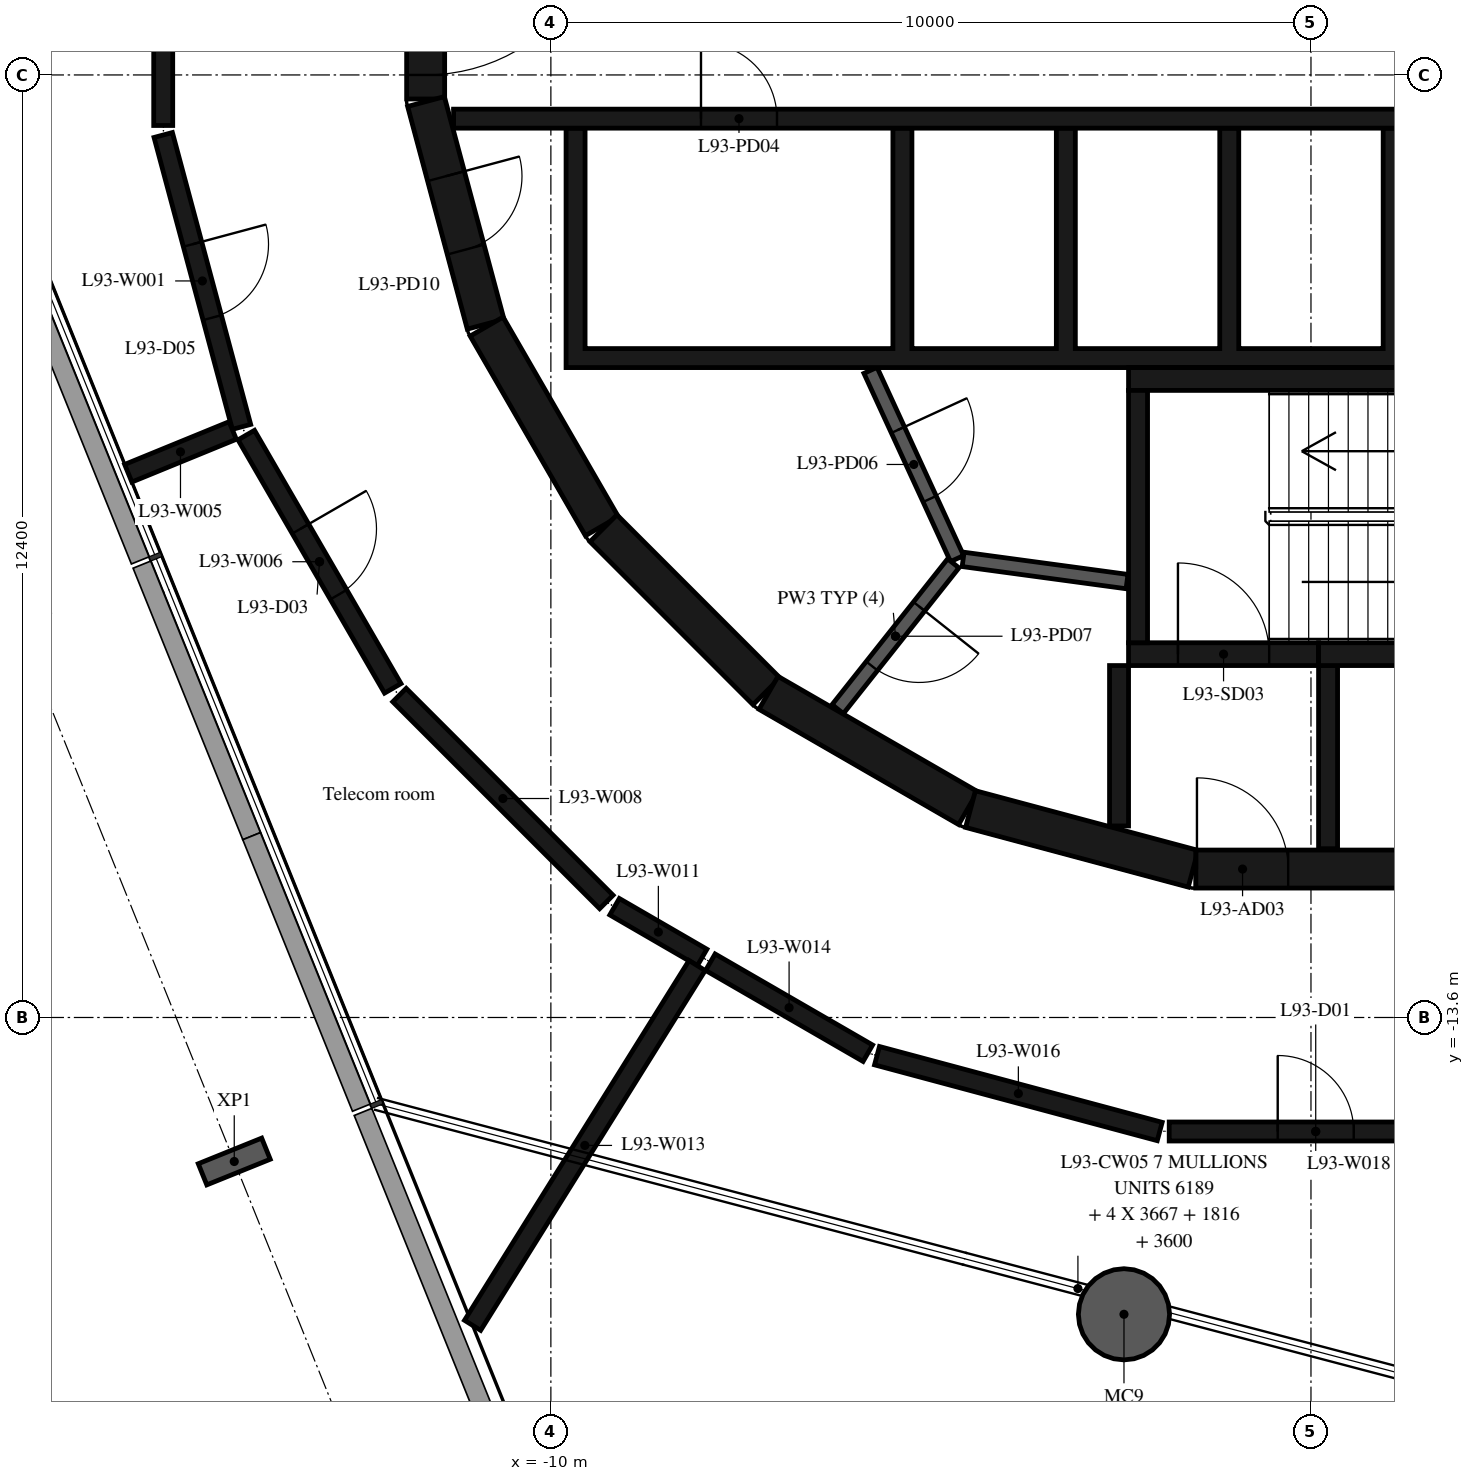
"""IFC4 building model, lengths in metres.
Left out: names, types, materials, properties, quantities, classifications, styles, units other than length and angle.
Written with IfcOpenShell. Run it as: python <this file> out.ifc"""

import sys

from ifc_helpers import new_model, si_unit, direction, frame, frame_2d, origin, origin_2d, place, context, subcontext, project, spatial, polyline, rectangle, hollow_circle, i_section, outline, extrude, element, fill, save


model = new_model("IFC4")
c1 = context("Model", 3, precision=1e-05, world=origin(), true_north=direction((0.0, 1.0)))
c2 = subcontext(c1, "Body", "Model", "MODEL_VIEW")
j1 = project(units=[si_unit("LENGTHUNIT", "METRE"), si_unit("PLANEANGLEUNIT", "RADIAN")], contexts=[c1])
p1 = place(None, origin())
s1 = spatial("IfcSite", under=j1, at=p1, CompositionType="ELEMENT")
p2 = place(p1, origin())
s2 = spatial("IfcBuilding", under=s1, at=p2, CompositionType="ELEMENT")
p3 = place(p2, frame((0.0, 0.0, 361.0)))
s3 = spatial("IfcBuildingStorey", under=s2, at=p3, CompositionType="ELEMENT", Elevation=361.0)
p4 = place(p3, frame((-2.46, -17.505, -0.38), z_axis=(0.0, 0.0, 1.0), x_axis=(1.0, 0.0, 0.0)))
e1 = element("IfcColumn", 1, at=p4, inside=s3, PredefinedType="COLUMN", context=c2, shape_type="SweptSolid", body=[
    extrude(hollow_circle(Radius=0.6, WallThickness=0.03, at=origin_2d()), origin(), (0.0, 0.0, 1.0), 5.2),
])
p5 = place(p3, frame((-14.166, -15.495, -0.38), z_axis=(0.0, 0.0, 1.0), x_axis=(-0.374606892434, 0.927183733755, 0.0)))
e2 = element("IfcColumn", 2, at=p5, inside=s3, PredefinedType="COLUMN", context=c2, shape_type="SweptSolid", body=[
    extrude(i_section(OverallWidth=0.3, OverallDepth=0.9, WebThickness=0.019, FlangeThickness=0.035, FilletRadius=0.03, at=origin_2d()), origin(), (0.0, 0.0, 1.0), 5.2),
])
p6 = place(p3, frame((-11.647, 1.516, 0.0), z_axis=(0.0, 0.0, 1.0), x_axis=(0.0, -1.0, 0.0)))
e3 = element("IfcWall", 3, at=p6, inside=s3, PredefinedType="SHEAR", context=c2, shape_type="SweptSolid", body=[
    extrude(rectangle(XDim=3.033, YDim=0.5, at=frame_2d((1.516, 0.0))), origin(), (0.0, 0.0, 1.0), 4.82),
])
p7 = place(p6, frame((0.316, 0.0, 0.0)))
e4 = element("IfcOpeningElement", 4, at=p7, cuts=e3, PredefinedType="OPENING", context=c2, shape_type="SweptSolid", body=[
    extrude(rectangle(XDim=2.4, YDim=2.1, at=frame_2d((1.2, 1.05))), frame((0.0, 0.26, 0.0), z_axis=(0.0, -1.0, 0.0), x_axis=(1.0, 0.0, 0.0)), (0.0, 0.0, 1.0), 0.52),
])
p8 = place(p3, frame((-11.643, -1.55, 0.0), z_axis=(0.0, 0.0, 1.0), x_axis=(0.258734743916, -0.965948410781, 0.0)))
e5 = element("IfcWall", 5, at=p8, inside=s3, PredefinedType="SHEAR", context=c2, shape_type="SweptSolid", body=[
    extrude(rectangle(XDim=3.033, YDim=0.5, at=frame_2d((1.516, 0.0))), origin(), (0.0, 0.0, 1.0), 4.82),
])
p9 = place(p8, frame((1.016, 0.0, 0.0)))
e6 = element("IfcOpeningElement", 6, at=p9, cuts=e5, PredefinedType="OPENING", context=c2, shape_type="SweptSolid", body=[
    extrude(rectangle(XDim=1.0, YDim=2.4, at=frame_2d((0.5, 1.2))), frame((0.0, 0.26, 0.0), z_axis=(0.0, -1.0, 0.0), x_axis=(1.0, 0.0, 0.0)), (0.0, 0.0, 1.0), 0.52),
])
p10 = place(p3, frame((-10.845, -4.51, 0.0), z_axis=(0.0, 0.0, 1.0), x_axis=(0.500087131594, -0.865975092491, 0.0)))
e7 = element("IfcWall", 7, at=p10, inside=s3, PredefinedType="SHEAR", context=c2, shape_type="SweptSolid", body=[
    extrude(rectangle(XDim=3.033, YDim=0.5, at=frame_2d((1.516, 0.0))), origin(), (0.0, 0.0, 1.0), 4.82),
])
p11 = place(p3, frame((-9.308, -7.164, 0.0), z_axis=(0.0, 0.0, 1.0), x_axis=(0.707106781187, -0.707106781187, 0.0)))
e8 = element("IfcWall", 8, at=p11, inside=s3, PredefinedType="SHEAR", context=c2, shape_type="SweptSolid", body=[
    extrude(rectangle(XDim=3.032, YDim=0.5, at=frame_2d((1.516, 0.0))), origin(), (0.0, 0.0, 1.0), 4.82),
])
for number, where, z_axis, x_axis in (
    (9, (-7.137, -9.329, 0.0), (0.0, 0.0, 1.0), (0.866, -0.5, 0.0)),
    (10, (-4.479, -10.858, 0.0), (0.0, 0.0, 1.0), (0.966, -0.259, 0.0)),
):
    element("IfcWall", number, at=place(p3, frame(where, z_axis=z_axis, x_axis=x_axis)), inside=s3, PredefinedType="SHEAR", context=c2, shape_type="SweptSolid", body=[
        extrude(rectangle(XDim=3.033, YDim=0.5, at=frame_2d((1.516, 0.0))), origin(), (0.0, 0.0, 1.0), 4.82),
    ])
p12 = place(p3, frame((-1.516, -11.647, 0.0), z_axis=(0.0, 0.0, 1.0), x_axis=(1.0, 0.0, 0.0)))
e11 = element("IfcWall", 11, at=p12, inside=s3, PredefinedType="SHEAR", context=c2, shape_type="SweptSolid", body=[
    extrude(rectangle(XDim=3.033, YDim=0.5, at=frame_2d((1.516, 0.0))), origin(), (0.0, 0.0, 1.0), 4.82),
])
p13 = place(p12, frame((0.016, 0.0, 0.0)))
e12 = element("IfcOpeningElement", 12, at=p13, cuts=e11, PredefinedType="OPENING", context=c2, shape_type="SweptSolid", body=[
    extrude(rectangle(XDim=1.2, YDim=2.1, at=frame_2d((0.6, 1.05))), frame((0.0, 0.26, 0.0), z_axis=(0.0, -1.0, 0.0), x_axis=(1.0, 0.0, 0.0)), (0.0, 0.0, 1.0), 0.52),
])
p14 = place(p3, frame((-2.275, -8.67, 0.0), z_axis=(0.0, 0.0, 1.0), x_axis=(0.0, 1.0, 0.0)))
e13 = element("IfcWall", 13, at=p14, inside=s3, PredefinedType="SHEAR", context=c2, shape_type="SweptSolid", body=[
    extrude(rectangle(XDim=3.32, YDim=0.25, at=frame_2d((1.66, 0.0))), origin(), (0.0, 0.0, 1.0), 4.82),
])
p15 = place(p3, frame((-2.4, -5.2, 0.0), z_axis=(0.0, 0.0, 1.0), x_axis=(1.0, 0.0, 0.0)))
e14 = element("IfcWall", 14, at=p15, inside=s3, PredefinedType="SHEAR", context=c2, shape_type="SweptSolid", body=[
    extrude(rectangle(XDim=7.05, YDim=0.3, at=frame_2d((3.525, 0.0))), origin(), (0.0, 0.0, 1.0), 4.82),
])
p16 = place(p3, frame((0.1, -8.82, 0.0), z_axis=(0.0, 0.0, 1.0), x_axis=(1.0, 0.0, 0.0)))
e15 = element("IfcWall", 15, at=p16, inside=s3, PredefinedType="SHEAR", context=c2, shape_type="SweptSolid", body=[
    extrude(rectangle(XDim=4.55, YDim=0.3, at=frame_2d((2.275, 0.0))), origin(), (0.0, 0.0, 1.0), 4.82),
])
p17 = place(p3, frame((-2.4, -8.82, 0.0), z_axis=(0.0, 0.0, 1.0), x_axis=(1.0, 0.0, 0.0)))
e16 = element("IfcWall", 16, at=p17, inside=s3, PredefinedType="SHEAR", context=c2, shape_type="SweptSolid", body=[
    extrude(rectangle(XDim=2.5, YDim=0.3, at=frame_2d((1.25, 0.0))), origin(), (0.0, 0.0, 1.0), 4.82),
])
p18 = place(p17, frame((0.65, 0.0, 0.0)))
e17 = element("IfcOpeningElement", 17, at=p18, cuts=e16, PredefinedType="OPENING", context=c2, shape_type="SweptSolid", body=[
    extrude(rectangle(XDim=1.2, YDim=2.1, at=frame_2d((0.6, 1.05))), frame((0.0, 0.16, 0.0), z_axis=(0.0, -1.0, 0.0), x_axis=(1.0, 0.0, 0.0)), (0.0, 0.0, 1.0), 0.32),
])
p19 = place(p3, frame((-2.525, -8.97, 0.0), z_axis=(0.0, 0.0, 1.0), x_axis=(0.0, -1.0, 0.0)))
e18 = element("IfcWall", 18, at=p19, inside=s3, PredefinedType="SHEAR", context=c2, shape_type="SweptSolid", body=[
    extrude(rectangle(XDim=2.11, YDim=0.25, at=frame_2d((1.055, 0.0))), origin(), (0.0, 0.0, 1.0), 4.82),
])
p20 = place(p3, frame((0.225, -8.97, 0.0), z_axis=(0.0, 0.0, 1.0), x_axis=(0.0, -1.0, 0.0)))
e19 = element("IfcWall", 19, at=p20, inside=s3, PredefinedType="SHEAR", context=c2, shape_type="SweptSolid", body=[
    extrude(rectangle(XDim=2.41, YDim=0.25, at=frame_2d((1.205, 0.0))), origin(), (0.0, 0.0, 1.0), 4.82),
])
p21 = place(p3, origin())
e20 = element("IfcWall", 20, at=p21, inside=s3, PredefinedType="SHEAR", context=c2, shape_type="SweptSolid", body=[
    extrude(outline(polyline([(9.8, -5.05), (9.8, -4.8), (9.8, -1.9), (9.55, -1.9), (9.55, -4.8), (7.65, -4.8), (7.65, -1.9), (7.4, -1.9), (7.4, -4.8), (5.5, -4.8), (5.5, -1.9), (5.25, -1.9), (5.25, -4.8), (3.35, -4.8), (3.35, -1.9), (3.1, -1.9), (3.1, -4.8), (1.2, -4.8), (1.2, -1.9), (0.95, -1.9), (0.95, -4.8), (-0.95, -4.8), (-0.95, -1.9), (-1.2, -1.9), (-1.2, -4.8), (-3.1, -4.8), (-3.1, -1.9), (-3.35, -1.9), (-3.35, -4.8), (-5.25, -4.8), (-5.25, -1.9), (-5.5, -1.9), (-5.5, -4.8), (-9.55, -4.8), (-9.55, -1.9), (-9.8, -1.9), (-9.8, -4.8), (-9.8, -5.05), (9.8, -5.05)])), origin(), (0.0, 0.0, 1.0), 4.82),
])
p22 = place(p3, frame((-11.28, -1.775, 0.0), z_axis=(0.0, 0.0, 1.0), x_axis=(1.0, 0.0, 0.0)))
e21 = element("IfcWall", 21, at=p22, inside=s3, PredefinedType="SHEAR", context=c2, shape_type="SweptSolid", body=[
    extrude(rectangle(XDim=14.38, YDim=0.25, at=frame_2d((7.19, 0.0))), origin(), (0.0, 0.0, 1.0), 4.82),
])
p23 = place(p22, frame((3.255, 0.0, 0.0)))
e22 = element("IfcOpeningElement", 22, at=p23, cuts=e21, PredefinedType="OPENING", context=c2, shape_type="SweptSolid", body=[
    extrude(rectangle(XDim=1.0, YDim=2.4, at=frame_2d((0.5, 1.2))), frame((0.0, 0.135, 0.0), z_axis=(0.0, -1.0, 0.0), x_axis=(1.0, 0.0, 0.0)), (0.0, 0.0, 1.0), 0.27),
])
p24 = place(p22, frame((12.93, 0.0, 0.0)))
e23 = element("IfcOpeningElement", 23, at=p24, cuts=e21, PredefinedType="OPENING", context=c2, shape_type="SweptSolid", body=[
    extrude(rectangle(XDim=1.0, YDim=2.4, at=frame_2d((0.5, 1.2))), frame((0.0, 0.135, 0.0), z_axis=(0.0, -1.0, 0.0), x_axis=(1.0, 0.0, 0.0)), (0.0, 0.0, 1.0), 0.27),
])
p25 = place(p3, frame((-5.795, -5.086, 0.0), z_axis=(0.0, 0.0, 1.0), x_axis=(0.417887867606, -0.908498613157, 0.0)))
e24 = element("IfcWall", 24, at=p25, inside=s3, PredefinedType="PARTITIONING", context=c2, shape_type="SweptSolid", body=[
    extrude(rectangle(XDim=2.726, YDim=0.19, at=frame_2d((1.363, 0.0))), origin(), (0.0, 0.0, 1.0), 4.82),
])
p26 = place(p25, frame((0.863, 0.0, 0.0)))
e25 = element("IfcOpeningElement", 25, at=p26, cuts=e24, PredefinedType="OPENING", context=c2, shape_type="SweptSolid", body=[
    extrude(rectangle(XDim=1.0, YDim=2.4, at=frame_2d((0.5, 1.2))), frame((0.0, 0.105, 0.0), z_axis=(0.0, -1.0, 0.0), x_axis=(1.0, 0.0, 0.0)), (0.0, 0.0, 1.0), 0.21),
])
p27 = place(p3, frame((-4.706, -7.625, 0.0), z_axis=(0.0, 0.0, 1.0), x_axis=(-0.621392599334, -0.783499353856, 0.0)))
e26 = element("IfcWall", 26, at=p27, inside=s3, PredefinedType="PARTITIONING", context=c2, shape_type="SweptSolid", body=[
    extrude(rectangle(XDim=2.447, YDim=0.19, at=frame_2d((1.224, 0.0))), origin(), (0.0, 0.0, 1.0), 4.82),
])
p28 = place(p27, frame((0.724, 0.0, 0.0)))
e27 = element("IfcOpeningElement", 27, at=p28, cuts=e26, PredefinedType="OPENING", context=c2, shape_type="SweptSolid", body=[
    extrude(rectangle(XDim=1.0, YDim=2.4, at=frame_2d((0.5, 1.2))), frame((0.0, 0.105, 0.0), z_axis=(0.0, -1.0, 0.0), x_axis=(1.0, 0.0, 0.0)), (0.0, 0.0, 1.0), 0.21),
])
p29 = place(p3, frame((-2.42, -7.865, 0.0), z_axis=(0.0, 0.0, 1.0), x_axis=(-0.990972299108, 0.134066783362, 0.0)))
e28 = element("IfcWall", 28, at=p29, inside=s3, PredefinedType="PARTITIONING", context=c2, shape_type="SweptSolid", body=[
    extrude(rectangle(XDim=2.176, YDim=0.19, at=frame_2d((1.088, 0.0))), origin(), (0.0, 0.0, 1.0), 4.82),
])
p30 = place(p3, frame((-15.1, -1.99, 0.0), z_axis=(0.0, 0.0, 1.0), x_axis=(0.259072679895, -0.965857829358, 0.0)))
e29 = element("IfcWall", 29, at=p30, inside=s3, PredefinedType="PARTITIONING", context=c2, shape_type="SweptSolid", body=[
    extrude(rectangle(XDim=3.976, YDim=0.25, at=frame_2d((1.988, 0.0))), origin(), (0.0, 0.0, 1.0), 4.82),
])
p31 = place(p30, frame((1.488, 0.0, 0.0)))
e30 = element("IfcOpeningElement", 30, at=p31, cuts=e29, PredefinedType="OPENING", context=c2, shape_type="SweptSolid", body=[
    extrude(rectangle(XDim=1.0, YDim=2.1, at=frame_2d((0.5, 1.05))), frame((0.0, 0.135, 0.0), z_axis=(0.0, -1.0, 0.0), x_axis=(1.0, 0.0, 0.0)), (0.0, 0.0, 1.0), 0.27),
])
p32 = place(p3, frame((-15.1, 1.99, 0.0), z_axis=(0.0, 0.0, 1.0), x_axis=(0.0, -1.0, 0.0)))
e31 = element("IfcWall", 31, at=p32, inside=s3, PredefinedType="PARTITIONING", context=c2, shape_type="SweptSolid", body=[
    extrude(rectangle(XDim=3.855, YDim=0.25, at=frame_2d((1.927, 0.0))), origin(), (0.0, 0.0, 1.0), 4.82),
])
p33 = place(p3, frame((-14.186, -5.877, 0.0), z_axis=(0.0, 0.0, 1.0), x_axis=(-0.925476228273, -0.378805690165, 0.0)))
e32 = element("IfcWall", 32, at=p33, inside=s3, PredefinedType="PARTITIONING", context=c2, shape_type="SweptSolid", body=[
    extrude(rectangle(XDim=1.485, YDim=0.25, at=frame_2d((0.742, 0.0))), origin(), (0.0, 0.0, 1.0), 4.82),
])
p34 = place(p3, frame((-14.007, -5.938, 0.0), z_axis=(0.0, 0.0, 1.0), x_axis=(0.500708693508, -0.865615852585, 0.0)))
e33 = element("IfcWall", 33, at=p34, inside=s3, PredefinedType="PARTITIONING", context=c2, shape_type="SweptSolid", body=[
    extrude(rectangle(XDim=3.849, YDim=0.25, at=frame_2d((1.925, 0.0))), origin(), (0.0, 0.0, 1.0), 4.82),
])
p35 = place(p34, frame((1.425, 0.0, 0.0)))
e34 = element("IfcOpeningElement", 34, at=p35, cuts=e33, PredefinedType="OPENING", context=c2, shape_type="SweptSolid", body=[
    extrude(rectangle(XDim=1.0, YDim=2.1, at=frame_2d((0.5, 1.05))), frame((0.0, 0.135, 0.0), z_axis=(0.0, -1.0, 0.0), x_axis=(1.0, 0.0, 0.0)), (0.0, 0.0, 1.0), 0.27),
])
p36 = place(p3, frame((-11.992, -9.358, 0.0), z_axis=(0.0, 0.0, 1.0), x_axis=(0.707106781187, -0.707106781187, 0.0)))
e35 = element("IfcWall", 35, at=p36, inside=s3, PredefinedType="PARTITIONING", context=c2, shape_type="SweptSolid", body=[
    extrude(rectangle(XDim=3.849, YDim=0.25, at=frame_2d((1.925, 0.0))), origin(), (0.0, 0.0, 1.0), 4.82),
])
p37 = place(p3, frame((-9.162, -12.143, 0.0), z_axis=(0.0, 0.0, 1.0), x_axis=(0.865225325987, -0.501383221968, 0.0)))
e36 = element("IfcWall", 36, at=p37, inside=s3, PredefinedType="PARTITIONING", context=c2, shape_type="SweptSolid", body=[
    extrude(rectangle(XDim=1.331, YDim=0.25, at=frame_2d((0.666, 0.0))), origin(), (0.0, 0.0, 1.0), 4.82),
])
p38 = place(p3, frame((-8.076, -12.916, 0.0), z_axis=(0.0, 0.0, 1.0), x_axis=(-0.529377395223, -0.848386452878, 0.0)))
e37 = element("IfcWall", 37, at=p38, inside=s3, PredefinedType="PARTITIONING", context=c2, shape_type="SweptSolid", body=[
    extrude(rectangle(XDim=5.58, YDim=0.25, at=frame_2d((2.79, 0.0))), origin(), (0.0, 0.0, 1.0), 4.82),
])
p39 = place(p3, frame((-7.902, -12.873, 0.0), z_axis=(0.0, 0.0, 1.0), x_axis=(0.865777653854, -0.500428870157, 0.0)))
e38 = element("IfcWall", 38, at=p39, inside=s3, PredefinedType="PARTITIONING", context=c2, shape_type="SweptSolid", body=[
    extrude(rectangle(XDim=2.393, YDim=0.25, at=frame_2d((1.197, 0.0))), origin(), (0.0, 0.0, 1.0), 4.82),
])
p40 = place(p3, frame((-5.709, -14.102, 0.0), z_axis=(0.0, 0.0, 1.0), x_axis=(0.965845546311, -0.259118468411, 0.0)))
e39 = element("IfcWall", 39, at=p40, inside=s3, PredefinedType="PARTITIONING", context=c2, shape_type="SweptSolid", body=[
    extrude(rectangle(XDim=3.851, YDim=0.25, at=frame_2d((1.925, 0.0))), origin(), (0.0, 0.0, 1.0), 4.82),
])
p41 = place(p3, frame((-1.865, -15.1, 0.0), z_axis=(0.0, 0.0, 1.0), x_axis=(1.0, 0.0, 0.0)))
e40 = element("IfcWall", 40, at=p41, inside=s3, PredefinedType="PARTITIONING", context=c2, shape_type="SweptSolid", body=[
    extrude(rectangle(XDim=3.855, YDim=0.25, at=frame_2d((1.927, 0.0))), origin(), (0.0, 0.0, 1.0), 4.82),
])
p42 = place(p41, frame((1.427, 0.0, 0.0)))
e41 = element("IfcOpeningElement", 41, at=p42, cuts=e40, PredefinedType="OPENING", context=c2, shape_type="SweptSolid", body=[
    extrude(rectangle(XDim=1.0, YDim=2.1, at=frame_2d((0.5, 1.05))), frame((0.0, 0.135, 0.0), z_axis=(0.0, -1.0, 0.0), x_axis=(1.0, 0.0, 0.0)), (0.0, 0.0, 1.0), 0.27),
])
p43 = place(p18, origin())
e42 = element("IfcDoor", 42, at=p43, inside=s3, OperationType="SINGLE_SWING_LEFT", PredefinedType="DOOR", context=c2, shape_type="SweptSolid", body=[
    extrude(rectangle(XDim=1.2, YDim=2.1, at=frame_2d((0.6, 1.05))), frame((0.0, 0.025, 0.0), z_axis=(0.0, -1.0, 0.0), x_axis=(1.0, 0.0, 0.0)), (0.0, 0.0, 1.0), 0.05),
])
fill(e17, e42)
p44 = place(p13, origin())
e43 = element("IfcDoor", 43, at=p44, inside=s3, OperationType="SINGLE_SWING_RIGHT", PredefinedType="DOOR", context=c2, shape_type="SweptSolid", body=[
    extrude(rectangle(XDim=1.2, YDim=2.1, at=frame_2d((0.6, 1.05))), frame((0.0, 0.025, 0.0), z_axis=(0.0, -1.0, 0.0), x_axis=(1.0, 0.0, 0.0)), (0.0, 0.0, 1.0), 0.05),
])
fill(e12, e43)
p45 = place(p7, origin())
e44 = element("IfcDoor", 44, at=p45, inside=s3, OperationType="DOUBLE_DOOR_SINGLE_SWING", PredefinedType="DOOR", context=c2, shape_type="SweptSolid", body=[
    extrude(rectangle(XDim=2.4, YDim=2.1, at=frame_2d((1.2, 1.05))), frame((0.0, 0.025, 0.0), z_axis=(0.0, -1.0, 0.0), x_axis=(1.0, 0.0, 0.0)), (0.0, 0.0, 1.0), 0.05),
])
fill(e4, e44)
p46 = place(p23, origin())
e45 = element("IfcDoor", 45, at=p46, inside=s3, OperationType="SINGLE_SWING_LEFT", PredefinedType="DOOR", context=c2, shape_type="SweptSolid", body=[
    extrude(rectangle(XDim=1.0, YDim=2.4, at=frame_2d((0.5, 1.2))), frame((0.0, 0.025, 0.0), z_axis=(0.0, -1.0, 0.0), x_axis=(1.0, 0.0, 0.0)), (0.0, 0.0, 1.0), 0.05),
])
fill(e22, e45)
p47 = place(p26, origin())
e46 = element("IfcDoor", 46, at=p47, inside=s3, OperationType="SINGLE_SWING_LEFT", PredefinedType="DOOR", context=c2, shape_type="SweptSolid", body=[
    extrude(rectangle(XDim=1.0, YDim=2.4, at=frame_2d((0.5, 1.2))), frame((0.0, 0.025, 0.0), z_axis=(0.0, -1.0, 0.0), x_axis=(1.0, 0.0, 0.0)), (0.0, 0.0, 1.0), 0.05),
])
fill(e25, e46)
p48 = place(p28, origin())
e47 = element("IfcDoor", 47, at=p48, inside=s3, OperationType="SINGLE_SWING_RIGHT", PredefinedType="DOOR", context=c2, shape_type="SweptSolid", body=[
    extrude(rectangle(XDim=1.0, YDim=2.4, at=frame_2d((0.5, 1.2))), frame((0.0, 0.025, 0.0), z_axis=(0.0, -1.0, 0.0), x_axis=(1.0, 0.0, 0.0)), (0.0, 0.0, 1.0), 0.05),
])
fill(e27, e47)
p49 = place(p9, origin())
e48 = element("IfcDoor", 48, at=p49, inside=s3, OperationType="SINGLE_SWING_LEFT", PredefinedType="DOOR", context=c2, shape_type="SweptSolid", body=[
    extrude(rectangle(XDim=1.0, YDim=2.4, at=frame_2d((0.5, 1.2))), frame((0.0, 0.025, 0.0), z_axis=(0.0, -1.0, 0.0), x_axis=(1.0, 0.0, 0.0)), (0.0, 0.0, 1.0), 0.05),
])
fill(e6, e48)
p50 = place(p42, origin())
e49 = element("IfcDoor", 49, at=p50, inside=s3, OperationType="SINGLE_SWING_LEFT", PredefinedType="DOOR", context=c2, shape_type="SweptSolid", body=[
    extrude(rectangle(XDim=1.0, YDim=2.1, at=frame_2d((0.5, 1.05))), frame((0.0, 0.025, 0.0), z_axis=(0.0, -1.0, 0.0), x_axis=(1.0, 0.0, 0.0)), (0.0, 0.0, 1.0), 0.05),
])
fill(e41, e49)
p51 = place(p35, origin())
e50 = element("IfcDoor", 50, at=p51, inside=s3, OperationType="SINGLE_SWING_LEFT", PredefinedType="DOOR", context=c2, shape_type="SweptSolid", body=[
    extrude(rectangle(XDim=1.0, YDim=2.1, at=frame_2d((0.5, 1.05))), frame((0.0, 0.025, 0.0), z_axis=(0.0, -1.0, 0.0), x_axis=(1.0, 0.0, 0.0)), (0.0, 0.0, 1.0), 0.05),
])
fill(e34, e50)
p52 = place(p31, origin())
e51 = element("IfcDoor", 51, at=p52, inside=s3, OperationType="SINGLE_SWING_LEFT", PredefinedType="DOOR", context=c2, shape_type="SweptSolid", body=[
    extrude(rectangle(XDim=1.0, YDim=2.1, at=frame_2d((0.5, 1.05))), frame((0.0, 0.025, 0.0), z_axis=(0.0, -1.0, 0.0), x_axis=(1.0, 0.0, 0.0)), (0.0, 0.0, 1.0), 0.05),
])
fill(e30, e51)
save(model, sys.argv[1])
